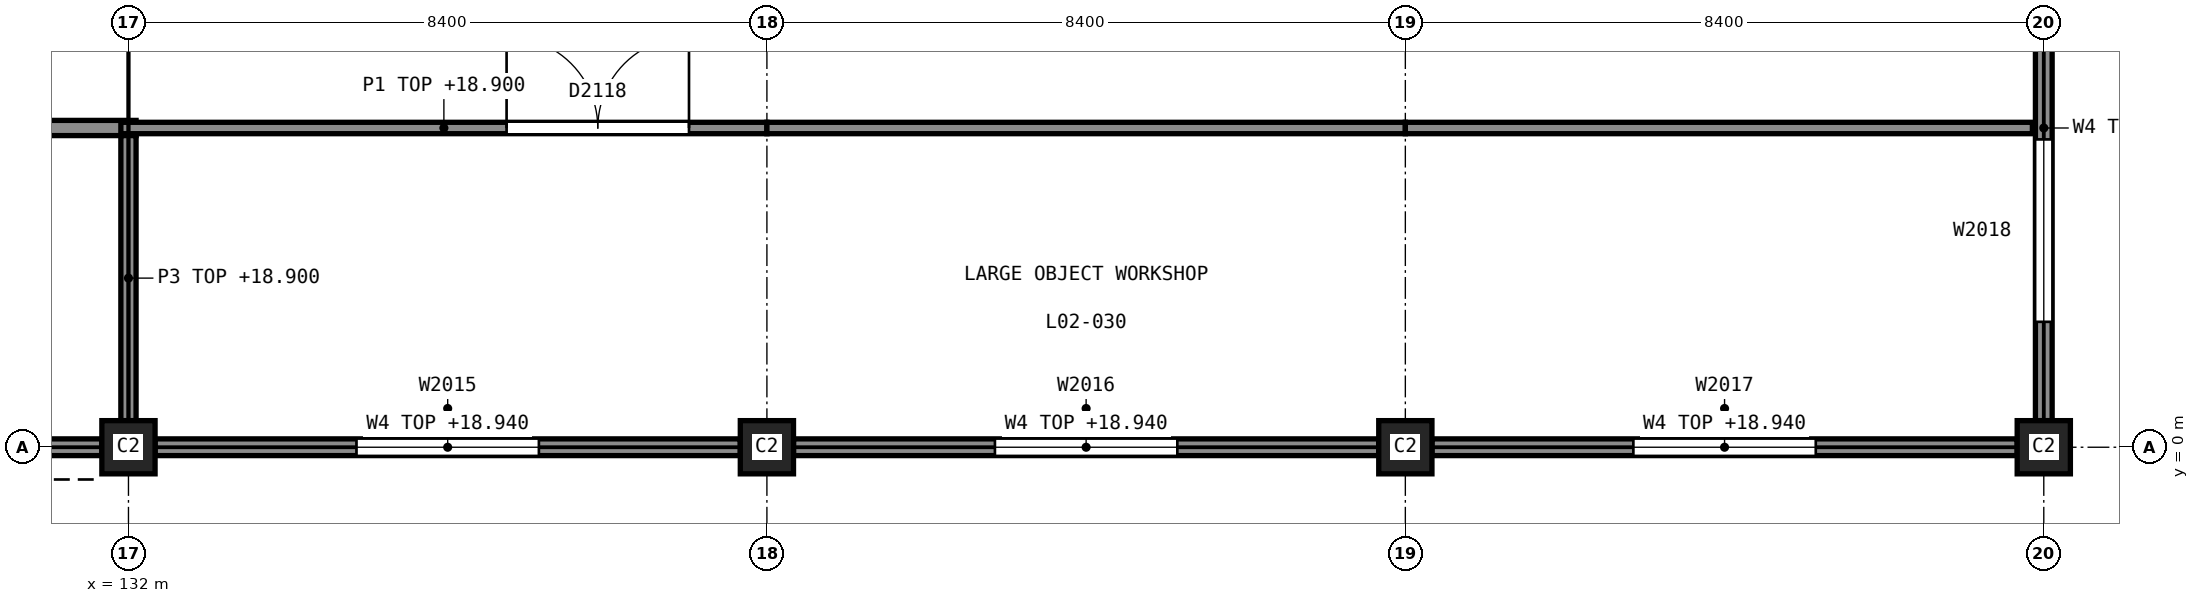
"""IFC4 building model, lengths in metres.
Left out: names, types, materials, properties, quantities, classifications, styles, units other than length and angle.
Written with IfcOpenShell. Run it as: python <this file> out.ifc"""

import sys

from ifc_helpers import new_model, si_unit, direction, frame, frame_2d, origin, origin_2d, place, context, subcontext, project, spatial, rectangle, extrude, element, fill, save


model = new_model("IFC4")
c1 = context("Model", 3, precision=1e-05, world=origin(), true_north=direction((0.0, 1.0)))
c2 = subcontext(c1, "Body", "Model", "MODEL_VIEW")
j1 = project(units=[si_unit("LENGTHUNIT", "METRE"), si_unit("PLANEANGLEUNIT", "RADIAN")], contexts=[c1])
p1 = place(None, origin())
s1 = spatial("IfcSite", under=j1, at=p1, CompositionType="ELEMENT")
p2 = place(p1, origin())
s2 = spatial("IfcBuilding", under=s1, at=p2, CompositionType="ELEMENT")
p3 = place(p2, frame((0.0, 0.0, 10.5)))
s3 = spatial("IfcBuildingStorey", under=s2, at=p3, CompositionType="ELEMENT", Elevation=10.5)
for number, where, z_axis, x_axis in (
    (1, (132.0, 0.0, 0.0), (0.0, 0.0, 1.0), (1.0, 0.0, 0.0)),
    (2, (140.4, 0.0, 0.0), (0.0, 0.0, 1.0), (1.0, 0.0, 0.0)),
    (3, (148.8, 0.0, 0.0), (0.0, 0.0, 1.0), (1.0, 0.0, 0.0)),
    (4, (157.2, 0.0, 0.0), (0.0, 0.0, 1.0), (1.0, 0.0, 0.0)),
):
    element("IfcColumn", number, at=place(p3, frame(where, z_axis=z_axis, x_axis=x_axis)), inside=s3, PredefinedType="COLUMN", context=c2, shape_type="SweptSolid", body=[
        extrude(rectangle(XDim=0.7, YDim=0.7, at=origin_2d()), origin(), (0.0, 0.0, 1.0), 9.5),
    ])
p4 = place(p3, frame((123.95, 0.0, 0.0), z_axis=(0.0, 0.0, 1.0), x_axis=(1.0, 0.0, 0.0)))
e5 = element("IfcWall", 5, at=p4, inside=s3, PredefinedType="SOLIDWALL", context=c2, shape_type="SweptSolid", body=[
    extrude(rectangle(XDim=7.7, YDim=0.22, at=frame_2d((3.85, 0.0))), origin(), (0.0, 0.0, 1.0), 8.44),
])
p5 = place(p4, frame((2.65, 0.0, 5.0)))
e6 = element("IfcOpeningElement", 6, at=p5, cuts=e5, PredefinedType="OPENING", context=c2, shape_type="SweptSolid", body=[
    extrude(rectangle(XDim=2.4, YDim=1.5, at=frame_2d((1.2, 0.75))), frame((0.0, 0.12, 0.0), z_axis=(0.0, -1.0, 0.0), x_axis=(1.0, 0.0, 0.0)), (0.0, 0.0, 1.0), 0.24),
])
p6 = place(p3, frame((132.35, 0.0, 0.0), z_axis=(0.0, 0.0, 1.0), x_axis=(1.0, 0.0, 0.0)))
e7 = element("IfcWall", 7, at=p6, inside=s3, PredefinedType="SOLIDWALL", context=c2, shape_type="SweptSolid", body=[
    extrude(rectangle(XDim=7.7, YDim=0.22, at=frame_2d((3.85, 0.0))), origin(), (0.0, 0.0, 1.0), 8.44),
])
p7 = place(p6, frame((2.65, 0.0, 5.0)))
e8 = element("IfcOpeningElement", 8, at=p7, cuts=e7, PredefinedType="OPENING", context=c2, shape_type="SweptSolid", body=[
    extrude(rectangle(XDim=2.4, YDim=1.5, at=frame_2d((1.2, 0.75))), frame((0.0, 0.12, 0.0), z_axis=(0.0, -1.0, 0.0), x_axis=(1.0, 0.0, 0.0)), (0.0, 0.0, 1.0), 0.24),
])
p8 = place(p3, frame((140.75, 0.0, 0.0), z_axis=(0.0, 0.0, 1.0), x_axis=(1.0, 0.0, 0.0)))
e9 = element("IfcWall", 9, at=p8, inside=s3, PredefinedType="SOLIDWALL", context=c2, shape_type="SweptSolid", body=[
    extrude(rectangle(XDim=7.7, YDim=0.22, at=frame_2d((3.85, 0.0))), origin(), (0.0, 0.0, 1.0), 8.44),
])
p9 = place(p8, frame((2.65, 0.0, 5.0)))
e10 = element("IfcOpeningElement", 10, at=p9, cuts=e9, PredefinedType="OPENING", context=c2, shape_type="SweptSolid", body=[
    extrude(rectangle(XDim=2.4, YDim=1.5, at=frame_2d((1.2, 0.75))), frame((0.0, 0.12, 0.0), z_axis=(0.0, -1.0, 0.0), x_axis=(1.0, 0.0, 0.0)), (0.0, 0.0, 1.0), 0.24),
])
p10 = place(p3, frame((149.15, 0.0, 0.0), z_axis=(0.0, 0.0, 1.0), x_axis=(1.0, 0.0, 0.0)))
e11 = element("IfcWall", 11, at=p10, inside=s3, PredefinedType="SOLIDWALL", context=c2, shape_type="SweptSolid", body=[
    extrude(rectangle(XDim=7.7, YDim=0.22, at=frame_2d((3.85, 0.0))), origin(), (0.0, 0.0, 1.0), 8.44),
])
p11 = place(p10, frame((2.65, 0.0, 5.0)))
e12 = element("IfcOpeningElement", 12, at=p11, cuts=e11, PredefinedType="OPENING", context=c2, shape_type="SweptSolid", body=[
    extrude(rectangle(XDim=2.4, YDim=1.5, at=frame_2d((1.2, 0.75))), frame((0.0, 0.12, 0.0), z_axis=(0.0, -1.0, 0.0), x_axis=(1.0, 0.0, 0.0)), (0.0, 0.0, 1.0), 0.24),
])
p12 = place(p3, frame((157.2, 0.35, 0.0), z_axis=(0.0, 0.0, 1.0), x_axis=(0.0, 1.0, 0.0)))
e13 = element("IfcWall", 13, at=p12, inside=s3, PredefinedType="SOLIDWALL", context=c2, shape_type="SweptSolid", body=[
    extrude(rectangle(XDim=7.7, YDim=0.22, at=frame_2d((3.85, 0.0))), origin(), (0.0, 0.0, 1.0), 8.44),
])
p13 = place(p12, frame((1.3, 0.0, 5.0)))
e14 = element("IfcOpeningElement", 14, at=p13, cuts=e13, PredefinedType="OPENING", context=c2, shape_type="SweptSolid", body=[
    extrude(rectangle(XDim=2.4, YDim=1.5, at=frame_2d((1.2, 0.75))), frame((0.0, 0.12, 0.0), z_axis=(0.0, -1.0, 0.0), x_axis=(1.0, 0.0, 0.0)), (0.0, 0.0, 1.0), 0.24),
])
p14 = place(p3, frame((123.6, 4.2, 0.0), z_axis=(0.0, 0.0, 1.0), x_axis=(1.0, 0.0, 0.0)))
e15 = element("IfcWall", 15, at=p14, inside=s3, PredefinedType="PARTITIONING", context=c2, shape_type="SweptSolid", body=[
    extrude(rectangle(XDim=8.5, YDim=0.2, at=frame_2d((4.25, 0.0))), origin(), (0.0, 0.0, 1.0), 8.4),
])
p15 = place(p3, frame((131.9, 4.2, 0.0), z_axis=(0.0, 0.0, 1.0), x_axis=(1.0, 0.0, 0.0)))
e16 = element("IfcWall", 16, at=p15, inside=s3, PredefinedType="PARTITIONING", context=c2, shape_type="SweptSolid", body=[
    extrude(rectangle(XDim=8.5, YDim=0.15, at=frame_2d((4.25, 0.0))), origin(), (0.0, 0.0, 1.0), 8.4),
])
p16 = place(p15, frame((5.075, 0.0, 0.0)))
e17 = element("IfcOpeningElement", 17, at=p16, cuts=e16, PredefinedType="OPENING", context=c2, shape_type="SweptSolid", body=[
    extrude(rectangle(XDim=2.4, YDim=2.4, at=frame_2d((1.2, 1.2))), frame((0.0, 0.085, 0.0), z_axis=(0.0, -1.0, 0.0), x_axis=(1.0, 0.0, 0.0)), (0.0, 0.0, 1.0), 0.17),
])
p17 = place(p3, frame((140.4, 4.2, 0.0), z_axis=(0.0, 0.0, 1.0), x_axis=(1.0, 0.0, 0.0)))
e18 = element("IfcWall", 18, at=p17, inside=s3, PredefinedType="PARTITIONING", context=c2, shape_type="SweptSolid", body=[
    extrude(rectangle(XDim=8.4, YDim=0.15, at=frame_2d((4.2, 0.0))), origin(), (0.0, 0.0, 1.0), 8.4),
])
p18 = place(p3, frame((148.8, 4.2, 0.0), z_axis=(0.0, 0.0, 1.0), x_axis=(1.0, 0.0, 0.0)))
e19 = element("IfcWall", 19, at=p18, inside=s3, PredefinedType="PARTITIONING", context=c2, shape_type="SweptSolid", body=[
    extrude(rectangle(XDim=8.25, YDim=0.15, at=frame_2d((4.125, 0.0))), origin(), (0.0, 0.0, 1.0), 8.4),
])
p19 = place(p3, frame((132.0, 0.35, 0.0), z_axis=(0.0, 0.0, 1.0), x_axis=(0.0, 1.0, 0.0)))
e20 = element("IfcWall", 20, at=p19, inside=s3, PredefinedType="PARTITIONING", context=c2, shape_type="SweptSolid", body=[
    extrude(rectangle(XDim=3.75, YDim=0.2, at=frame_2d((1.875, 0.0))), origin(), (0.0, 0.0, 1.0), 8.4),
])
p20 = place(p7, origin())
e21 = element("IfcWindow", 21, at=p20, inside=s3, PartitioningType="SINGLE_PANEL", PredefinedType="WINDOW", context=c2, shape_type="SweptSolid", body=[
    extrude(rectangle(XDim=2.4, YDim=1.5, at=frame_2d((1.2, 0.75))), frame((0.0, 0.09, 0.0), z_axis=(0.0, -1.0, 0.0), x_axis=(1.0, 0.0, 0.0)), (0.0, 0.0, 1.0), 0.06),
])
fill(e8, e21)
p21 = place(p9, origin())
e22 = element("IfcWindow", 22, at=p21, inside=s3, PartitioningType="SINGLE_PANEL", PredefinedType="WINDOW", context=c2, shape_type="SweptSolid", body=[
    extrude(rectangle(XDim=2.4, YDim=1.5, at=frame_2d((1.2, 0.75))), frame((0.0, 0.09, 0.0), z_axis=(0.0, -1.0, 0.0), x_axis=(1.0, 0.0, 0.0)), (0.0, 0.0, 1.0), 0.06),
])
fill(e10, e22)
p22 = place(p11, origin())
e23 = element("IfcWindow", 23, at=p22, inside=s3, PartitioningType="SINGLE_PANEL", PredefinedType="WINDOW", context=c2, shape_type="SweptSolid", body=[
    extrude(rectangle(XDim=2.4, YDim=1.5, at=frame_2d((1.2, 0.75))), frame((0.0, 0.09, 0.0), z_axis=(0.0, -1.0, 0.0), x_axis=(1.0, 0.0, 0.0)), (0.0, 0.0, 1.0), 0.06),
])
fill(e12, e23)
p23 = place(p13, origin())
e24 = element("IfcWindow", 24, at=p23, inside=s3, PartitioningType="SINGLE_PANEL", PredefinedType="WINDOW", context=c2, shape_type="SweptSolid", body=[
    extrude(rectangle(XDim=2.4, YDim=1.5, at=frame_2d((1.2, 0.75))), frame((0.0, 0.09, 0.0), z_axis=(0.0, -1.0, 0.0), x_axis=(1.0, 0.0, 0.0)), (0.0, 0.0, 1.0), 0.06),
])
fill(e14, e24)
p24 = place(p16, origin())
e25 = element("IfcDoor", 25, at=p24, inside=s3, OperationType="DOUBLE_DOOR_SINGLE_SWING", PredefinedType="DOOR", context=c2, shape_type="SweptSolid", body=[
    extrude(rectangle(XDim=2.4, YDim=2.4, at=frame_2d((1.2, 1.2))), frame((0.0, 0.025, 0.0), z_axis=(0.0, -1.0, 0.0), x_axis=(1.0, 0.0, 0.0)), (0.0, 0.0, 1.0), 0.05),
])
fill(e17, e25)
save(model, sys.argv[1])
